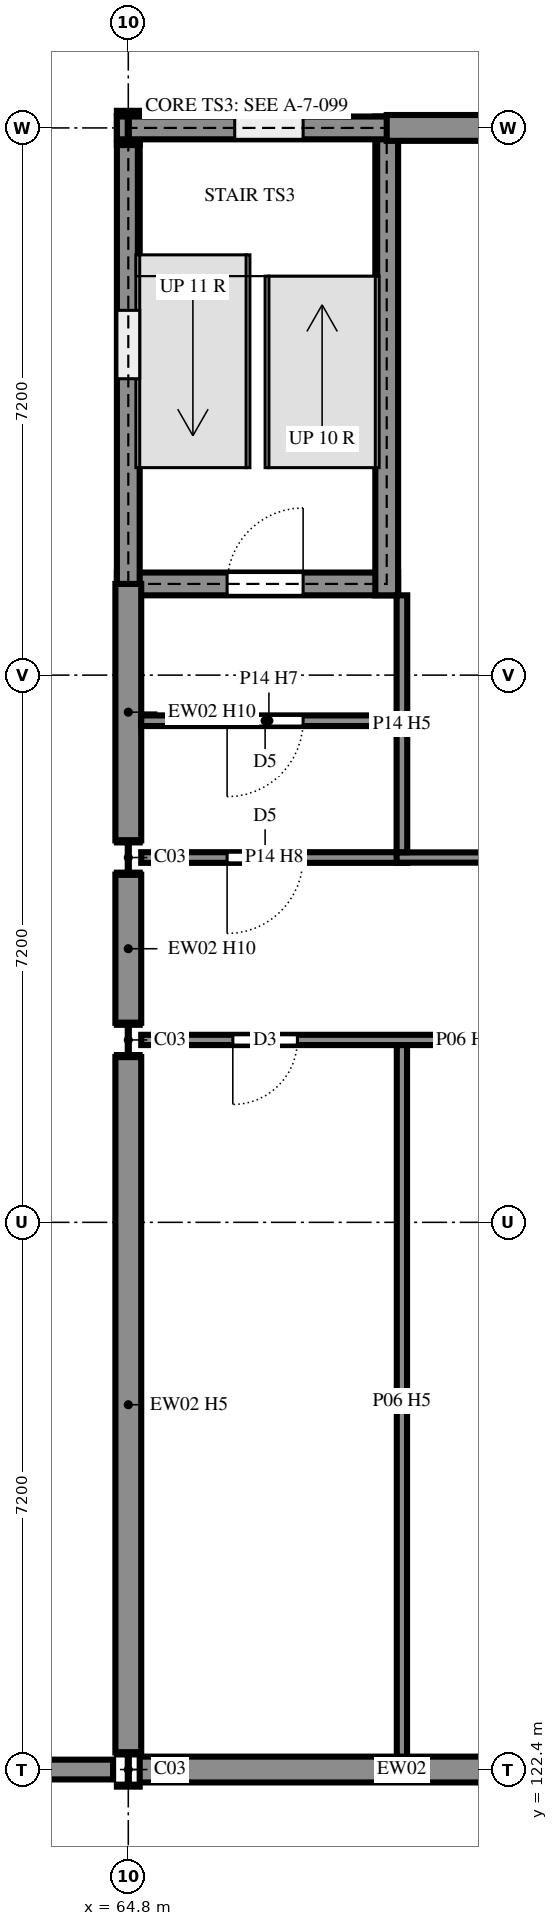
"""IFC4 building model, lengths in metres.
Left out: names, types, materials, properties, quantities, classifications, styles, units other than length and angle.
Written with IfcOpenShell. Run it as: python <this file> out.ifc"""

import sys

from ifc_helpers import new_model, si_unit, direction, frame, frame_2d, origin, origin_2d, place, context, subcontext, project, spatial, rectangle, i_section, extrude, element, fill, save


model = new_model("IFC4")
c1 = context("Model", 3, precision=1e-05, world=origin(), true_north=direction((0.0, 1.0)))
c2 = subcontext(c1, "Body", "Model", "MODEL_VIEW")
j1 = project(units=[si_unit("LENGTHUNIT", "METRE"), si_unit("PLANEANGLEUNIT", "RADIAN")], contexts=[c1])
p1 = place(None, origin())
s1 = spatial("IfcSite", under=j1, at=p1, CompositionType="ELEMENT")
p2 = place(p1, origin())
s2 = spatial("IfcBuilding", under=s1, at=p2, CompositionType="ELEMENT")
p3 = place(p2, frame((0.0, 0.0, 18.0)))
s3 = spatial("IfcBuildingStorey", under=s2, at=p3, CompositionType="ELEMENT", Elevation=18.0)
for number, where, z_axis, x_axis in (
    (1, (64.8, 122.4, 0.0), (0.0, 0.0, 1.0), (1.0, 0.0, 0.0)),
    (2, (64.8, 132.0, 0.0), (0.0, 0.0, 1.0), (1.0, 0.0, 0.0)),
    (3, (64.8, 134.4, 0.0), (0.0, 0.0, 1.0), (1.0, 0.0, 0.0)),
    (4, (64.8, 144.0, 0.0), (0.0, 0.0, 1.0), (1.0, 0.0, 0.0)),
):
    element("IfcColumn", number, at=place(p3, frame(where, z_axis=z_axis, x_axis=x_axis)), inside=s3, PredefinedType="COLUMN", context=c2, shape_type="SweptSolid", body=[
        extrude(i_section(OverallWidth=0.3, OverallDepth=0.45, WebThickness=0.014, FlangeThickness=0.026, FilletRadius=0.027, at=origin_2d()), origin(), (0.0, 0.0, 1.0), 3.6),
    ])
p4 = place(p3, frame((64.65, 138.0, 0.0), z_axis=(0.0, 0.0, 1.0), x_axis=(1.0, 0.0, 0.0)))
e5 = element("IfcWall", 5, at=p4, inside=s3, PredefinedType="SHEAR", context=c2, shape_type="SweptSolid", body=[
    extrude(rectangle(XDim=3.7, YDim=0.3, at=frame_2d((1.85, 0.0))), origin(), (0.0, 0.0, 1.0), 3.6),
])
p5 = place(p4, frame((1.45, 0.0, 0.0)))
e6 = element("IfcOpeningElement", 6, at=p5, cuts=e5, PredefinedType="OPENING", context=c2, shape_type="SweptSolid", body=[
    extrude(rectangle(XDim=1.0, YDim=2.1, at=frame_2d((0.5, 1.05))), frame((0.0, 0.16, 0.0), z_axis=(0.0, -1.0, 0.0), x_axis=(1.0, 0.0, 0.0)), (0.0, 0.0, 1.0), 0.32),
])
p6 = place(p3, frame((68.2, 137.85, 0.0), z_axis=(0.0, 0.0, 1.0), x_axis=(0.0, 1.0, 0.0)))
e7 = element("IfcWall", 7, at=p6, inside=s3, PredefinedType="SHEAR", context=c2, shape_type="SweptSolid", body=[
    extrude(rectangle(XDim=6.3, YDim=0.3, at=frame_2d((3.15, 0.0))), origin(), (0.0, 0.0, 1.0), 3.6),
])
p7 = place(p3, frame((64.8, 144.15, 0.0), z_axis=(0.0, 0.0, 1.0), x_axis=(0.0, -1.0, 0.0)))
e8 = element("IfcWall", 8, at=p7, inside=s3, PredefinedType="SHEAR", context=c2, shape_type="SweptSolid", body=[
    extrude(rectangle(XDim=6.3, YDim=0.3, at=frame_2d((3.15, 0.0))), origin(), (0.0, 0.0, 1.0), 3.6),
])
p8 = place(p7, frame((2.55, 0.0, 0.6)))
e9 = element("IfcOpeningElement", 9, at=p8, cuts=e8, PredefinedType="OPENING", context=c2, shape_type="SweptSolid", body=[
    extrude(rectangle(XDim=0.9, YDim=2.1, at=frame_2d((0.45, 1.05))), frame((0.0, 0.16, 0.0), z_axis=(0.0, -1.0, 0.0), x_axis=(1.0, 0.0, 0.0)), (0.0, 0.0, 1.0), 0.32),
])
p9 = place(p3, frame((68.35, 144.0, 0.0), z_axis=(0.0, 0.0, 1.0), x_axis=(-1.0, 0.0, 0.0)))
e10 = element("IfcWall", 10, at=p9, inside=s3, PredefinedType="SHEAR", context=c2, shape_type="SweptSolid", body=[
    extrude(rectangle(XDim=3.7, YDim=0.3, at=frame_2d((1.85, 0.0))), origin(), (0.0, 0.0, 1.0), 3.6),
])
p10 = place(p9, frame((1.25, 0.0, 0.6)))
e11 = element("IfcOpeningElement", 11, at=p10, cuts=e10, PredefinedType="OPENING", context=c2, shape_type="SweptSolid", body=[
    extrude(rectangle(XDim=0.9, YDim=2.1, at=frame_2d((0.45, 1.05))), frame((0.0, 0.16, 0.0), z_axis=(0.0, -1.0, 0.0), x_axis=(1.0, 0.0, 0.0)), (0.0, 0.0, 1.0), 0.32),
])
p11 = place(p3, frame((7.07, 122.4, 0.0), z_axis=(0.0, 0.0, 1.0), x_axis=(1.0, 0.0, 0.0)))
e12 = element("IfcWall", 12, at=p11, inside=s3, PredefinedType="PARAPET", context=c2, shape_type="SweptSolid", body=[
    extrude(rectangle(XDim=57.53, YDim=0.26, at=frame_2d((28.765, 0.0))), origin(), (0.0, 0.0, 1.0), 1.1),
])
p12 = place(p3, frame((71.846, 144.0, 0.0), z_axis=(0.0, 0.0, 1.0), x_axis=(-1.0, 0.0, 0.0)))
e13 = element("IfcWall", 13, at=p12, inside=s3, PredefinedType="SOLIDWALL", context=c2, shape_type="SweptSolid", body=[
    extrude(rectangle(XDim=3.646, YDim=0.34, at=frame_2d((1.823, 0.0))), origin(), (0.0, 0.0, 1.0), 3.26),
])
p13 = place(p3, frame((64.95, 122.4, 0.0), z_axis=(0.0, 0.0, 1.0), x_axis=(1.0, 0.0, 0.0)))
e14 = element("IfcWall", 14, at=p13, inside=s3, PredefinedType="SOLIDWALL", context=c2, shape_type="SweptSolid", body=[
    extrude(rectangle(XDim=6.896, YDim=0.34, at=frame_2d((3.448, 0.0))), origin(), (0.0, 0.0, 1.0), 3.16),
])
p14 = place(p3, frame((64.8, 138.0, 0.0), z_axis=(0.0, 0.0, 1.0), x_axis=(0.0, -1.0, 0.0)))
e15 = element("IfcWall", 15, at=p14, inside=s3, PredefinedType="SOLIDWALL", context=c2, shape_type="SweptSolid", body=[
    extrude(rectangle(XDim=3.375, YDim=0.34, at=frame_2d((1.688, 0.0))), origin(), (0.0, 0.0, 1.0), 3.26),
])
p15 = place(p3, frame((64.8, 134.175, 0.0), z_axis=(0.0, 0.0, 1.0), x_axis=(0.0, -1.0, 0.0)))
e16 = element("IfcWall", 16, at=p15, inside=s3, PredefinedType="SOLIDWALL", context=c2, shape_type="SweptSolid", body=[
    extrude(rectangle(XDim=1.95, YDim=0.34, at=frame_2d((0.975, 0.0))), origin(), (0.0, 0.0, 1.0), 3.26),
])
p16 = place(p3, frame((64.8, 131.775, 0.0), z_axis=(0.0, 0.0, 1.0), x_axis=(0.0, -1.0, 0.0)))
e17 = element("IfcWall", 17, at=p16, inside=s3, PredefinedType="SOLIDWALL", context=c2, shape_type="SweptSolid", body=[
    extrude(rectangle(XDim=9.15, YDim=0.34, at=frame_2d((4.575, 0.0))), origin(), (0.0, 0.0, 1.0), 3.06),
])
p17 = place(p3, frame((64.97, 132.0, 0.0), z_axis=(0.0, 0.0, 1.0), x_axis=(1.0, 0.0, 0.0)))
e18 = element("IfcWall", 18, at=p17, inside=s3, PredefinedType="PARTITIONING", context=c2, shape_type="SweptSolid", body=[
    extrude(rectangle(XDim=28.43, YDim=0.135, at=frame_2d((14.215, 0.0))), origin(), (0.0, 0.0, 1.0), 3.16),
])
p18 = place(p17, frame((1.205, 0.0, 0.0)))
e19 = element("IfcOpeningElement", 19, at=p18, cuts=e18, PredefinedType="OPENING", context=c2, shape_type="SweptSolid", body=[
    extrude(rectangle(XDim=0.85, YDim=2.1, at=frame_2d((0.425, 1.05))), frame((0.0, 0.077, 0.0), z_axis=(0.0, -1.0, 0.0), x_axis=(1.0, 0.0, 0.0)), (0.0, 0.0, 1.0), 0.155),
])
p19 = place(p17, frame((11.83, 0.0, 0.0)))
e20 = element("IfcOpeningElement", 20, at=p19, cuts=e18, PredefinedType="OPENING", context=c2, shape_type="SweptSolid", body=[
    extrude(rectangle(XDim=1.8, YDim=2.1, at=frame_2d((0.9, 1.05))), frame((0.0, 0.077, 0.0), z_axis=(0.0, -1.0, 0.0), x_axis=(1.0, 0.0, 0.0)), (0.0, 0.0, 1.0), 0.155),
])
p20 = place(p17, frame((24.53, 0.0, 0.0)))
e21 = element("IfcOpeningElement", 21, at=p20, cuts=e18, PredefinedType="OPENING", context=c2, shape_type="SweptSolid", body=[
    extrude(rectangle(XDim=1.0, YDim=2.4, at=frame_2d((0.5, 1.2))), frame((0.0, 0.077, 0.0), z_axis=(0.0, -1.0, 0.0), x_axis=(1.0, 0.0, 0.0)), (0.0, 0.0, 1.0), 0.155),
])
p21 = place(p17, frame((4.73, 0.0, 0.0)))
e22 = element("IfcOpeningElement", 22, at=p21, cuts=e18, PredefinedType="OPENING", context=c2, shape_type="SweptSolid", body=[
    extrude(rectangle(XDim=1.0, YDim=2.4, at=frame_2d((0.5, 1.2))), frame((0.0, 0.077, 0.0), z_axis=(0.0, -1.0, 0.0), x_axis=(1.0, 0.0, 0.0)), (0.0, 0.0, 1.0), 0.155),
])
p22 = place(p3, frame((64.97, 134.4, 0.0), z_axis=(0.0, 0.0, 1.0), x_axis=(1.0, 0.0, 0.0)))
e23 = element("IfcWall", 23, at=p22, inside=s3, PredefinedType="PARTITIONING", context=c2, shape_type="SweptSolid", body=[
    extrude(rectangle(XDim=3.5, YDim=0.14, at=frame_2d((1.75, 0.0))), origin(), (0.0, 0.0, 1.0), 3.16),
])
p23 = place(p22, frame((1.13, 0.0, 0.0)))
e24 = element("IfcOpeningElement", 24, at=p23, cuts=e23, PredefinedType="OPENING", context=c2, shape_type="SweptSolid", body=[
    extrude(rectangle(XDim=1.0, YDim=2.1, at=frame_2d((0.5, 1.05))), frame((0.0, 0.08, 0.0), z_axis=(0.0, -1.0, 0.0), x_axis=(1.0, 0.0, 0.0)), (0.0, 0.0, 1.0), 0.16),
])
p24 = place(p3, frame((68.33, 134.4, 0.0), z_axis=(0.0, 0.0, 1.0), x_axis=(1.0, 0.0, 0.0)))
e25 = element("IfcWall", 25, at=p24, inside=s3, PredefinedType="PARTITIONING", context=c2, shape_type="SweptSolid", body=[
    extrude(rectangle(XDim=25.07, YDim=0.135, at=frame_2d((12.535, 0.0))), origin(), (0.0, 0.0, 1.0), 3.16),
])
p25 = place(p24, frame((6.37, 0.0, 0.0)))
e26 = element("IfcOpeningElement", 26, at=p25, cuts=e25, PredefinedType="OPENING", context=c2, shape_type="SweptSolid", body=[
    extrude(rectangle(XDim=1.8, YDim=2.1, at=frame_2d((0.9, 1.05))), frame((0.0, 0.077, 0.0), z_axis=(0.0, -1.0, 0.0), x_axis=(1.0, 0.0, 0.0)), (0.0, 0.0, 1.0), 0.155),
])
p26 = place(p24, frame((19.37, 0.0, 0.0)))
e27 = element("IfcOpeningElement", 27, at=p26, cuts=e25, PredefinedType="OPENING", context=c2, shape_type="SweptSolid", body=[
    extrude(rectangle(XDim=1.0, YDim=2.4, at=frame_2d((0.5, 1.2))), frame((0.0, 0.077, 0.0), z_axis=(0.0, -1.0, 0.0), x_axis=(1.0, 0.0, 0.0)), (0.0, 0.0, 1.0), 0.155),
])
p27 = place(p3, frame((64.97, 136.2, 0.0), z_axis=(0.0, 0.0, 1.0), x_axis=(1.0, 0.0, 0.0)))
e28 = element("IfcWall", 28, at=p27, inside=s3, PredefinedType="PARTITIONING", context=c2, shape_type="SweptSolid", body=[
    extrude(rectangle(XDim=3.36, YDim=0.14, at=frame_2d((1.68, 0.0))), origin(), (0.0, 0.0, 1.0), 3.46),
])
p28 = place(p27, frame((1.13, 0.0, 0.0)))
e29 = element("IfcOpeningElement", 29, at=p28, cuts=e28, PredefinedType="OPENING", context=c2, shape_type="SweptSolid", body=[
    extrude(rectangle(XDim=1.0, YDim=2.1, at=frame_2d((0.5, 1.05))), frame((0.0, 0.08, 0.0), z_axis=(0.0, -1.0, 0.0), x_axis=(1.0, 0.0, 0.0)), (0.0, 0.0, 1.0), 0.16),
])
p29 = place(p3, frame((68.4, 122.57, 0.0), z_axis=(0.0, 0.0, 1.0), x_axis=(0.0, 1.0, 0.0)))
e30 = element("IfcWall", 30, at=p29, inside=s3, PredefinedType="PARTITIONING", context=c2, shape_type="SweptSolid", body=[
    extrude(rectangle(XDim=9.363, YDim=0.135, at=frame_2d((4.681, 0.0))), origin(), (0.0, 0.0, 1.0), 3.06),
])
p30 = place(p3, frame((68.4, 134.47, 0.0), z_axis=(0.0, 0.0, 1.0), x_axis=(0.0, 1.0, 0.0)))
e31 = element("IfcWall", 31, at=p30, inside=s3, PredefinedType="PARTITIONING", context=c2, shape_type="SweptSolid", body=[
    extrude(rectangle(XDim=3.38, YDim=0.14, at=frame_2d((1.69, 0.0))), origin(), (0.0, 0.0, 1.0), 3.06),
])
p31 = place(p10, origin())
e32 = element("IfcWindow", 32, at=p31, inside=s3, PartitioningType="SINGLE_PANEL", PredefinedType="WINDOW", context=c2, shape_type="SweptSolid", body=[
    extrude(rectangle(XDim=0.9, YDim=2.1, at=frame_2d((0.45, 1.05))), frame((0.0, 0.03, 0.0), z_axis=(0.0, -1.0, 0.0), x_axis=(1.0, 0.0, 0.0)), (0.0, 0.0, 1.0), 0.06),
])
fill(e11, e32)
p32 = place(p8, origin())
e33 = element("IfcWindow", 33, at=p32, inside=s3, PartitioningType="SINGLE_PANEL", PredefinedType="WINDOW", context=c2, shape_type="SweptSolid", body=[
    extrude(rectangle(XDim=0.9, YDim=2.1, at=frame_2d((0.45, 1.05))), frame((0.0, 0.03, 0.0), z_axis=(0.0, -1.0, 0.0), x_axis=(1.0, 0.0, 0.0)), (0.0, 0.0, 1.0), 0.06),
])
fill(e9, e33)
p33 = place(p18, frame((0.85, 0.0, 0.0), z_axis=(0.0, 0.0, 1.0), x_axis=(-1.0, 0.0, 0.0)))
e34 = element("IfcDoor", 34, at=p33, inside=s3, OperationType="SINGLE_SWING_LEFT", PredefinedType="DOOR", context=c2, shape_type="SweptSolid", body=[
    extrude(rectangle(XDim=0.85, YDim=2.1, at=frame_2d((0.425, 1.05))), frame((0.0, 0.025, 0.0), z_axis=(0.0, -1.0, 0.0), x_axis=(1.0, 0.0, 0.0)), (0.0, 0.0, 1.0), 0.05),
])
fill(e19, e34)
p34 = place(p23, frame((1.0, 0.0, 0.0), z_axis=(0.0, 0.0, 1.0), x_axis=(-1.0, 0.0, 0.0)))
e35 = element("IfcDoor", 35, at=p34, inside=s3, OperationType="SINGLE_SWING_LEFT", PredefinedType="DOOR", context=c2, shape_type="SweptSolid", body=[
    extrude(rectangle(XDim=1.0, YDim=2.1, at=frame_2d((0.5, 1.05))), frame((0.0, 0.025, 0.0), z_axis=(0.0, -1.0, 0.0), x_axis=(1.0, 0.0, 0.0)), (0.0, 0.0, 1.0), 0.05),
])
fill(e24, e35)
p35 = place(p28, frame((1.0, 0.0, 0.0), z_axis=(0.0, 0.0, 1.0), x_axis=(-1.0, 0.0, 0.0)))
e36 = element("IfcDoor", 36, at=p35, inside=s3, OperationType="SINGLE_SWING_LEFT", PredefinedType="DOOR", context=c2, shape_type="SweptSolid", body=[
    extrude(rectangle(XDim=1.0, YDim=2.1, at=frame_2d((0.5, 1.05))), frame((0.0, 0.025, 0.0), z_axis=(0.0, -1.0, 0.0), x_axis=(1.0, 0.0, 0.0)), (0.0, 0.0, 1.0), 0.05),
])
fill(e29, e36)
p36 = place(p5, origin())
e37 = element("IfcDoor", 37, at=p36, inside=s3, OperationType="SINGLE_SWING_LEFT", PredefinedType="DOOR", context=c2, shape_type="SweptSolid", body=[
    extrude(rectangle(XDim=1.0, YDim=2.1, at=frame_2d((0.5, 1.05))), frame((0.0, 0.025, 0.0), z_axis=(0.0, -1.0, 0.0), x_axis=(1.0, 0.0, 0.0)), (0.0, 0.0, 1.0), 0.05),
])
fill(e6, e37)
save(model, sys.argv[1])
